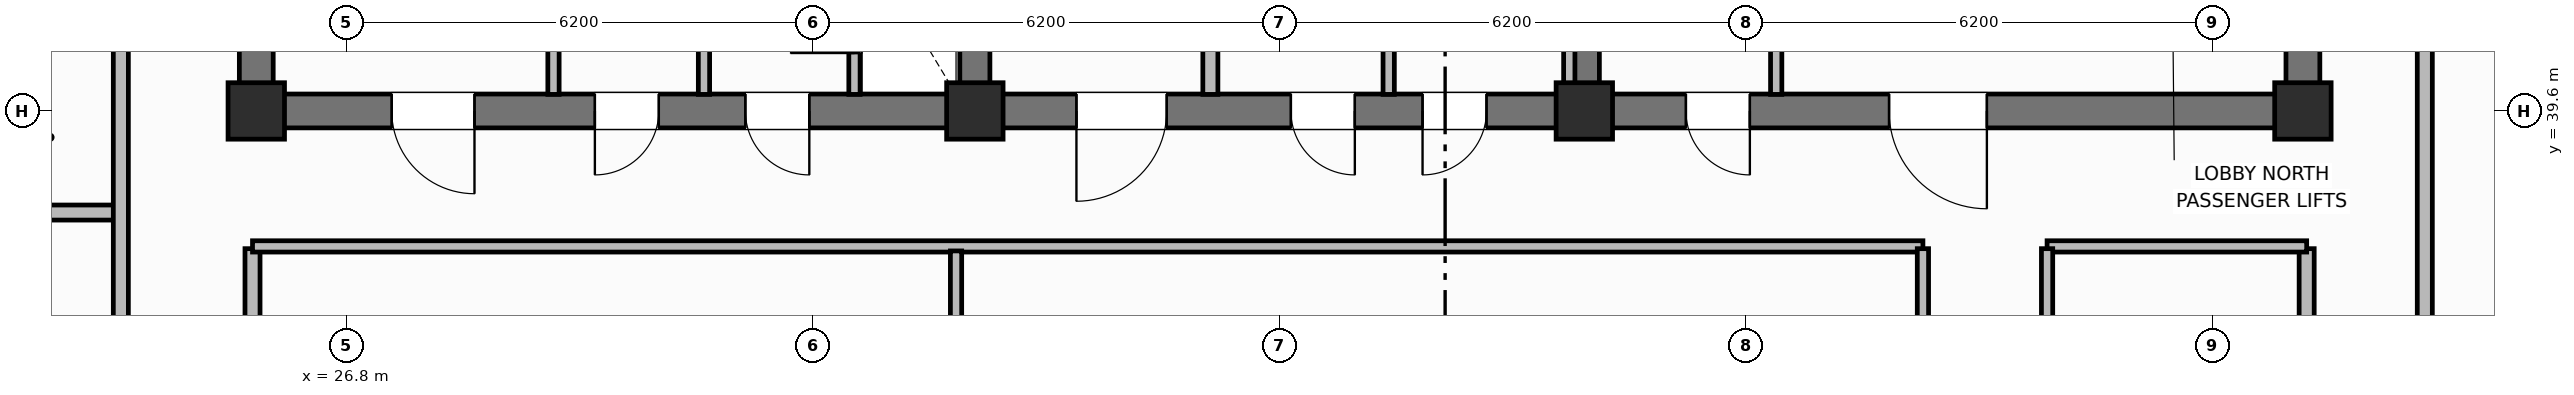
"""IFC4 building model, lengths in metres.
Left out: names, types, materials, properties, quantities, classifications, styles, units other than length and angle.
Written with IfcOpenShell. Run it as: python <this file> out.ifc"""

import sys

from ifc_helpers import new_model, si_unit, direction, frame, frame_2d, origin, origin_2d, place, context, subcontext, project, spatial, rectangle, extrude, element, fill, save


model = new_model("IFC4")
c1 = context("Model", 3, precision=1e-05, world=origin(), true_north=direction((0.0, 1.0)))
c2 = subcontext(c1, "Body", "Model", "MODEL_VIEW")
j1 = project(units=[si_unit("LENGTHUNIT", "METRE"), si_unit("PLANEANGLEUNIT", "RADIAN")], contexts=[c1])
p1 = place(None, origin())
s1 = spatial("IfcSite", under=j1, at=p1, CompositionType="ELEMENT")
p2 = place(p1, origin())
s2 = spatial("IfcBuilding", under=s1, at=p2, CompositionType="ELEMENT")
p3 = place(p2, frame((0.0, 0.0, 271.3)))
s3 = spatial("IfcBuildingStorey", under=s2, at=p3, CompositionType="ELEMENT", Elevation=271.3)
for number, where, z_axis, x_axis in (
    (1, (25.6, 39.825, 0.0), (0.0, 0.0, 1.0), (0.0, 1.0, 0.0)),
    (2, (52.8, 39.825, 0.0), (0.0, 0.0, 1.0), (0.0, 1.0, 0.0)),
):
    element("IfcWall", number, at=place(p3, frame(where, z_axis=z_axis, x_axis=x_axis)), inside=s3, PredefinedType="SHEAR", context=c2, shape_type="SweptSolid", body=[
        extrude(rectangle(XDim=5.75, YDim=0.45, at=frame_2d((2.875, 0.0))), origin(), (0.0, 0.0, 1.0), 3.7),
    ])
p4 = place(p3, frame((52.8, 39.6, 0.0), z_axis=(0.0, 0.0, 1.0), x_axis=(-1.0, 0.0, 0.0)))
e3 = element("IfcWall", 3, at=p4, inside=s3, PredefinedType="SHEAR", context=c2, shape_type="SweptSolid", body=[
    extrude(rectangle(XDim=27.2, YDim=0.45, at=frame_2d((13.6, 0.0))), origin(), (0.0, 0.0, 1.0), 3.7),
])
p5 = place(p4, frame((24.3, 0.0, 0.0)))
e4 = element("IfcOpeningElement", 4, at=p5, cuts=e3, PredefinedType="OPENING", context=c2, shape_type="SweptSolid", body=[
    extrude(rectangle(XDim=1.1, YDim=2.15, at=frame_2d((0.55, 1.075))), frame((0.0, 0.235, 0.0), z_axis=(0.0, -1.0, 0.0), x_axis=(1.0, 0.0, 0.0)), (0.0, 0.0, 1.0), 0.47),
])
p6 = place(p4, frame((21.85, 0.0, 0.0)))
e5 = element("IfcOpeningElement", 5, at=p6, cuts=e3, PredefinedType="OPENING", context=c2, shape_type="SweptSolid", body=[
    extrude(rectangle(XDim=0.85, YDim=2.1, at=frame_2d((0.425, 1.05))), frame((0.0, 0.235, 0.0), z_axis=(0.0, -1.0, 0.0), x_axis=(1.0, 0.0, 0.0)), (0.0, 0.0, 1.0), 0.47),
])
p7 = place(p4, frame((19.85, 0.0, 0.0)))
e6 = element("IfcOpeningElement", 6, at=p7, cuts=e3, PredefinedType="OPENING", context=c2, shape_type="SweptSolid", body=[
    extrude(rectangle(XDim=0.85, YDim=2.1, at=frame_2d((0.425, 1.05))), frame((0.0, 0.235, 0.0), z_axis=(0.0, -1.0, 0.0), x_axis=(1.0, 0.0, 0.0)), (0.0, 0.0, 1.0), 0.47),
])
p8 = place(p4, frame((15.1, 0.0, 0.0)))
e7 = element("IfcOpeningElement", 7, at=p8, cuts=e3, PredefinedType="OPENING", context=c2, shape_type="SweptSolid", body=[
    extrude(rectangle(XDim=1.2, YDim=2.15, at=frame_2d((0.6, 1.075))), frame((0.0, 0.235, 0.0), z_axis=(0.0, -1.0, 0.0), x_axis=(1.0, 0.0, 0.0)), (0.0, 0.0, 1.0), 0.47),
])
p9 = place(p4, frame((12.6, 0.0, 0.0)))
e8 = element("IfcOpeningElement", 8, at=p9, cuts=e3, PredefinedType="OPENING", context=c2, shape_type="SweptSolid", body=[
    extrude(rectangle(XDim=0.85, YDim=2.1, at=frame_2d((0.425, 1.05))), frame((0.0, 0.235, 0.0), z_axis=(0.0, -1.0, 0.0), x_axis=(1.0, 0.0, 0.0)), (0.0, 0.0, 1.0), 0.47),
])
p10 = place(p4, frame((10.85, 0.0, 0.0)))
e9 = element("IfcOpeningElement", 9, at=p10, cuts=e3, PredefinedType="OPENING", context=c2, shape_type="SweptSolid", body=[
    extrude(rectangle(XDim=0.85, YDim=2.1, at=frame_2d((0.425, 1.05))), frame((0.0, 0.235, 0.0), z_axis=(0.0, -1.0, 0.0), x_axis=(1.0, 0.0, 0.0)), (0.0, 0.0, 1.0), 0.47),
])
p11 = place(p4, frame((7.35, 0.0, 0.0)))
e10 = element("IfcOpeningElement", 10, at=p11, cuts=e3, PredefinedType="OPENING", context=c2, shape_type="SweptSolid", body=[
    extrude(rectangle(XDim=0.85, YDim=2.1, at=frame_2d((0.425, 1.05))), frame((0.0, 0.235, 0.0), z_axis=(0.0, -1.0, 0.0), x_axis=(1.0, 0.0, 0.0)), (0.0, 0.0, 1.0), 0.47),
])
p12 = place(p4, frame((4.2, 0.0, 0.0)))
e11 = element("IfcOpeningElement", 11, at=p12, cuts=e3, PredefinedType="OPENING", context=c2, shape_type="SweptSolid", body=[
    extrude(rectangle(XDim=1.3, YDim=2.2, at=frame_2d((0.65, 1.1))), frame((0.0, 0.235, 0.0), z_axis=(0.0, -1.0, 0.0), x_axis=(1.0, 0.0, 0.0)), (0.0, 0.0, 1.0), 0.47),
])
for number, where, z_axis, x_axis in (
    (12, (35.15, 39.825, 0.0), (0.0, 0.0, 1.0), (0.0, 1.0, 0.0)),
    (13, (43.25, 39.825, 0.0), (0.0, 0.0, 1.0), (0.0, 1.0, 0.0)),
):
    element("IfcWall", number, at=place(p3, frame(where, z_axis=z_axis, x_axis=x_axis)), inside=s3, PredefinedType="SHEAR", context=c2, shape_type="SweptSolid", body=[
        extrude(rectangle(XDim=5.75, YDim=0.4, at=frame_2d((2.875, 0.0))), origin(), (0.0, 0.0, 1.0), 3.7),
    ])
for number, where, z_axis, x_axis in (
    (14, (25.6, 39.6, 0.0), (0.0, 0.0, 1.0), (1.0, 0.0, 0.0)),
    (15, (35.15, 39.6, 0.0), (0.0, 0.0, 1.0), (1.0, 0.0, 0.0)),
    (16, (43.25, 39.6, 0.0), (0.0, 0.0, 1.0), (1.0, 0.0, 0.0)),
    (17, (52.8, 39.6, 0.0), (0.0, 0.0, 1.0), (1.0, 0.0, 0.0)),
):
    element("IfcColumn", number, at=place(p3, frame(where, z_axis=z_axis, x_axis=x_axis)), inside=s3, PredefinedType="COLUMN", context=c2, shape_type="SweptSolid", body=[
        extrude(rectangle(XDim=0.75, YDim=0.75, at=origin_2d()), origin(), (0.0, 0.0, 1.0), 3.7),
    ])
p13 = place(p3, frame((33.55, 39.82, 0.0), z_axis=(0.0, 0.0, 1.0), x_axis=(0.0, 1.0, 0.0)))
e18 = element("IfcWall", 18, at=p13, inside=s3, PredefinedType="PARTITIONING", context=c2, shape_type="SweptSolid", body=[
    extrude(rectangle(XDim=2.13, YDim=0.15, at=frame_2d((1.065, 0.0))), origin(), (0.0, 0.0, 1.0), 2.56),
])
p14 = place(p13, frame((0.55, 0.0, 0.0)))
e19 = element("IfcOpeningElement", 19, at=p14, cuts=e18, PredefinedType="OPENING", context=c2, shape_type="SweptSolid", body=[
    extrude(rectangle(XDim=0.85, YDim=2.05, at=frame_2d((0.425, 1.025))), frame((0.0, 0.085, 0.0), z_axis=(0.0, -1.0, 0.0), x_axis=(1.0, 0.0, 0.0)), (0.0, 0.0, 1.0), 0.17),
])
for number, where, z_axis, x_axis in (
    (20, (29.55, 39.82, 0.0), (0.0, 0.0, 1.0), (0.0, 1.0, 0.0)),
    (21, (31.55, 39.82, 0.0), (0.0, 0.0, 1.0), (0.0, 1.0, 0.0)),
):
    element("IfcWall", number, at=place(p3, frame(where, z_axis=z_axis, x_axis=x_axis)), inside=s3, PredefinedType="PARTITIONING", context=c2, shape_type="SweptSolid", body=[
        extrude(rectangle(XDim=2.13, YDim=0.15, at=frame_2d((1.065, 0.0))), origin(), (0.0, 0.0, 1.0), 2.56),
    ])
p15 = place(p3, frame((38.28, 39.82, 0.0), z_axis=(0.0, 0.0, 1.0), x_axis=(0.0, 1.0, 0.0)))
e22 = element("IfcWall", 22, at=p15, inside=s3, PredefinedType="PARTITIONING", context=c2, shape_type="SweptSolid", body=[
    extrude(rectangle(XDim=5.63, YDim=0.2, at=frame_2d((2.815, 0.0))), origin(), (0.0, 0.0, 1.0), 2.56),
])
for number, where, z_axis, x_axis in (
    (23, (43.05, 39.82, 0.0), (0.0, 0.0, 1.0), (0.0, 1.0, 0.0)),
    (24, (40.65, 39.82, 0.0), (0.0, 0.0, 1.0), (0.0, 1.0, 0.0)),
    (25, (45.8, 39.82, 0.0), (0.0, 0.0, 1.0), (0.0, 1.0, 0.0)),
):
    element("IfcWall", number, at=place(p3, frame(where, z_axis=z_axis, x_axis=x_axis)), inside=s3, PredefinedType="PARTITIONING", context=c2, shape_type="SweptSolid", body=[
        extrude(rectangle(XDim=5.63, YDim=0.15, at=frame_2d((2.815, 0.0))), origin(), (0.0, 0.0, 1.0), 2.56),
    ])
for number, where, z_axis, x_axis in (
    (26, (25.55, 18.63, 0.0), (0.0, 0.0, 1.0), (0.0, 1.0, 0.0)),
    (27, (52.85, 18.63, 0.0), (0.0, 0.0, 1.0), (0.0, 1.0, 0.0)),
):
    element("IfcWall", number, at=place(p3, frame(where, z_axis=z_axis, x_axis=x_axis)), inside=s3, PredefinedType="PARTITIONING", context=c2, shape_type="SweptSolid", body=[
        extrude(rectangle(XDim=19.14, YDim=0.2, at=frame_2d((9.57, 0.0))), origin(), (0.0, 0.0, 1.0), 2.56),
    ])
p16 = place(p3, frame((25.55, 37.8, 0.0), z_axis=(0.0, 0.0, 1.0), x_axis=(1.0, 0.0, 0.0)))
e28 = element("IfcWall", 28, at=p16, inside=s3, PredefinedType="PARTITIONING", context=c2, shape_type="SweptSolid", body=[
    extrude(rectangle(XDim=22.2, YDim=0.15, at=frame_2d((11.1, 0.0))), origin(), (0.0, 0.0, 1.0), 2.56),
])
p17 = place(p3, frame((49.4, 37.8, 0.0), z_axis=(0.0, 0.0, 1.0), x_axis=(1.0, 0.0, 0.0)))
e29 = element("IfcWall", 29, at=p17, inside=s3, PredefinedType="PARTITIONING", context=c2, shape_type="SweptSolid", body=[
    extrude(rectangle(XDim=3.45, YDim=0.15, at=frame_2d((1.725, 0.0))), origin(), (0.0, 0.0, 1.0), 2.56),
])
p18 = place(p3, frame((34.9, 18.66, 0.0), z_axis=(0.0, 0.0, 1.0), x_axis=(0.0, 1.0, 0.0)))
e30 = element("IfcWall", 30, at=p18, inside=s3, PredefinedType="PARTITIONING", context=c2, shape_type="SweptSolid", body=[
    extrude(rectangle(XDim=19.08, YDim=0.15, at=frame_2d((9.54, 0.0))), origin(), (0.0, 0.0, 1.0), 2.56),
])
p19 = place(p18, frame((5.0, 0.0, 0.0)))
e31 = element("IfcOpeningElement", 31, at=p19, cuts=e30, PredefinedType="OPENING", context=c2, shape_type="SweptSolid", body=[
    extrude(rectangle(XDim=1.0, YDim=2.15, at=frame_2d((0.5, 1.075))), frame((0.0, 0.085, 0.0), z_axis=(0.0, -1.0, 0.0), x_axis=(1.0, 0.0, 0.0)), (0.0, 0.0, 1.0), 0.17),
])
p20 = place(p3, frame((47.75, 18.63, 0.0), z_axis=(0.0, 0.0, 1.0), x_axis=(0.0, 1.0, 0.0)))
e32 = element("IfcWall", 32, at=p20, inside=s3, PredefinedType="PARTITIONING", context=c2, shape_type="SweptSolid", body=[
    extrude(rectangle(XDim=19.14, YDim=0.15, at=frame_2d((9.57, 0.0))), origin(), (0.0, 0.0, 1.0), 2.56),
])
p21 = place(p20, frame((2.4, 0.0, 0.0)))
e33 = element("IfcOpeningElement", 33, at=p21, cuts=e32, PredefinedType="OPENING", context=c2, shape_type="SweptSolid", body=[
    extrude(rectangle(XDim=0.9, YDim=2.1, at=frame_2d((0.45, 1.05))), frame((0.0, 0.085, 0.0), z_axis=(0.0, -1.0, 0.0), x_axis=(1.0, 0.0, 0.0)), (0.0, 0.0, 1.0), 0.17),
])
p22 = place(p20, frame((10.804, 0.0, 0.0)))
e34 = element("IfcOpeningElement", 34, at=p22, cuts=e32, PredefinedType="OPENING", context=c2, shape_type="SweptSolid", body=[
    extrude(rectangle(XDim=0.9, YDim=2.1, at=frame_2d((0.45, 1.05))), frame((0.0, 0.085, 0.0), z_axis=(0.0, -1.0, 0.0), x_axis=(1.0, 0.0, 0.0)), (0.0, 0.0, 1.0), 0.17),
])
p23 = place(p3, frame((49.4, 18.63, 0.0), z_axis=(0.0, 0.0, 1.0), x_axis=(0.0, 1.0, 0.0)))
e35 = element("IfcWall", 35, at=p23, inside=s3, PredefinedType="PARTITIONING", context=c2, shape_type="SweptSolid", body=[
    extrude(rectangle(XDim=19.14, YDim=0.15, at=frame_2d((9.57, 0.0))), origin(), (0.0, 0.0, 1.0), 2.56),
])
p24 = place(p23, frame((2.4, 0.0, 0.0)))
e36 = element("IfcOpeningElement", 36, at=p24, cuts=e35, PredefinedType="OPENING", context=c2, shape_type="SweptSolid", body=[
    extrude(rectangle(XDim=1.0, YDim=2.15, at=frame_2d((0.5, 1.075))), frame((0.0, 0.085, 0.0), z_axis=(0.0, -1.0, 0.0), x_axis=(1.0, 0.0, 0.0)), (0.0, 0.0, 1.0), 0.17),
])
p25 = place(p23, frame((10.804, 0.0, 0.0)))
e37 = element("IfcOpeningElement", 37, at=p25, cuts=e35, PredefinedType="OPENING", context=c2, shape_type="SweptSolid", body=[
    extrude(rectangle(XDim=1.0, YDim=2.15, at=frame_2d((0.5, 1.075))), frame((0.0, 0.085, 0.0), z_axis=(0.0, -1.0, 0.0), x_axis=(1.0, 0.0, 0.0)), (0.0, 0.0, 1.0), 0.17),
])
p26 = place(p3, frame((19.53, 38.25, 0.0), z_axis=(0.0, 0.0, 1.0), x_axis=(1.0, 0.0, 0.0)))
e38 = element("IfcWall", 38, at=p26, inside=s3, PredefinedType="PARTITIONING", context=c2, shape_type="SweptSolid", body=[
    extrude(rectangle(XDim=4.27, YDim=0.2, at=frame_2d((2.135, 0.0))), origin(), (0.0, 0.0, 1.0), 2.56),
])
p27 = place(p3, frame((23.8, 9.95, 0.0), z_axis=(0.0, 0.0, 1.0), x_axis=(0.0, 1.0, 0.0)))
e39 = element("IfcWall", 39, at=p27, inside=s3, PredefinedType="PARTITIONING", context=c2, shape_type="SweptSolid", body=[
    extrude(rectangle(XDim=36.5, YDim=0.2, at=frame_2d((18.25, 0.0))), origin(), (0.0, 0.0, 1.0), 2.56),
])
p28 = place(p27, frame((3.11, 0.0, 0.0)))
e40 = element("IfcOpeningElement", 40, at=p28, cuts=e39, PredefinedType="OPENING", context=c2, shape_type="SweptSolid", body=[
    extrude(rectangle(XDim=1.0, YDim=2.15, at=frame_2d((0.5, 1.075))), frame((0.0, 0.11, 0.0), z_axis=(0.0, -1.0, 0.0), x_axis=(1.0, 0.0, 0.0)), (0.0, 0.0, 1.0), 0.22),
])
p29 = place(p27, frame((11.99, 0.0, 0.0)))
e41 = element("IfcOpeningElement", 41, at=p29, cuts=e39, PredefinedType="OPENING", context=c2, shape_type="SweptSolid", body=[
    extrude(rectangle(XDim=1.0, YDim=2.15, at=frame_2d((0.5, 1.075))), frame((0.0, 0.11, 0.0), z_axis=(0.0, -1.0, 0.0), x_axis=(1.0, 0.0, 0.0)), (0.0, 0.0, 1.0), 0.22),
])
p30 = place(p27, frame((23.5, 0.0, 0.0)))
e42 = element("IfcOpeningElement", 42, at=p30, cuts=e39, PredefinedType="OPENING", context=c2, shape_type="SweptSolid", body=[
    extrude(rectangle(XDim=1.0, YDim=2.15, at=frame_2d((0.5, 1.075))), frame((0.0, 0.11, 0.0), z_axis=(0.0, -1.0, 0.0), x_axis=(1.0, 0.0, 0.0)), (0.0, 0.0, 1.0), 0.22),
])
p31 = place(p27, frame((31.2, 0.0, 0.0)))
e43 = element("IfcOpeningElement", 43, at=p31, cuts=e39, PredefinedType="OPENING", context=c2, shape_type="SweptSolid", body=[
    extrude(rectangle(XDim=1.0, YDim=2.15, at=frame_2d((0.5, 1.075))), frame((0.0, 0.11, 0.0), z_axis=(0.0, -1.0, 0.0), x_axis=(1.0, 0.0, 0.0)), (0.0, 0.0, 1.0), 0.22),
])
p32 = place(p3, frame((54.42, 9.95, 0.0), z_axis=(0.0, 0.0, 1.0), x_axis=(0.0, 1.0, 0.0)))
e44 = element("IfcWall", 44, at=p32, inside=s3, PredefinedType="PARTITIONING", context=c2, shape_type="SweptSolid", body=[
    extrude(rectangle(XDim=36.5, YDim=0.2, at=frame_2d((18.25, 0.0))), origin(), (0.0, 0.0, 1.0), 2.56),
])
p33 = place(p32, frame((3.25, 0.0, 0.0)))
e45 = element("IfcOpeningElement", 45, at=p33, cuts=e44, PredefinedType="OPENING", context=c2, shape_type="SweptSolid", body=[
    extrude(rectangle(XDim=1.0, YDim=2.15, at=frame_2d((0.5, 1.075))), frame((0.0, 0.11, 0.0), z_axis=(0.0, -1.0, 0.0), x_axis=(1.0, 0.0, 0.0)), (0.0, 0.0, 1.0), 0.22),
])
p34 = place(p32, frame((14.25, 0.0, 0.0)))
e46 = element("IfcOpeningElement", 46, at=p34, cuts=e44, PredefinedType="OPENING", context=c2, shape_type="SweptSolid", body=[
    extrude(rectangle(XDim=1.0, YDim=2.15, at=frame_2d((0.5, 1.075))), frame((0.0, 0.11, 0.0), z_axis=(0.0, -1.0, 0.0), x_axis=(1.0, 0.0, 0.0)), (0.0, 0.0, 1.0), 0.22),
])
p35 = place(p14, origin())
e47 = element("IfcDoor", 47, at=p35, inside=s3, OperationType="SINGLE_SWING_LEFT", PredefinedType="TRAPDOOR", context=c2, shape_type="SweptSolid", body=[
    extrude(rectangle(XDim=0.85, YDim=2.05, at=frame_2d((0.425, 1.025))), frame((0.0, 0.025, 0.0), z_axis=(0.0, -1.0, 0.0), x_axis=(1.0, 0.0, 0.0)), (0.0, 0.0, 1.0), 0.05),
])
fill(e19, e47)
p36 = place(p5, origin())
e48 = element("IfcDoor", 48, at=p36, inside=s3, OperationType="SINGLE_SWING_LEFT", PredefinedType="DOOR", context=c2, shape_type="SweptSolid", body=[
    extrude(rectangle(XDim=1.1, YDim=2.15, at=frame_2d((0.55, 1.075))), frame((0.0, 0.025, 0.0), z_axis=(0.0, -1.0, 0.0), x_axis=(1.0, 0.0, 0.0)), (0.0, 0.0, 1.0), 0.05),
])
fill(e4, e48)
p37 = place(p6, origin())
e49 = element("IfcDoor", 49, at=p37, inside=s3, OperationType="SINGLE_SWING_RIGHT", PredefinedType="DOOR", context=c2, shape_type="SweptSolid", body=[
    extrude(rectangle(XDim=0.85, YDim=2.1, at=frame_2d((0.425, 1.05))), frame((0.0, 0.025, 0.0), z_axis=(0.0, -1.0, 0.0), x_axis=(1.0, 0.0, 0.0)), (0.0, 0.0, 1.0), 0.05),
])
fill(e5, e49)
p38 = place(p7, origin())
e50 = element("IfcDoor", 50, at=p38, inside=s3, OperationType="SINGLE_SWING_LEFT", PredefinedType="DOOR", context=c2, shape_type="SweptSolid", body=[
    extrude(rectangle(XDim=0.85, YDim=2.1, at=frame_2d((0.425, 1.05))), frame((0.0, 0.025, 0.0), z_axis=(0.0, -1.0, 0.0), x_axis=(1.0, 0.0, 0.0)), (0.0, 0.0, 1.0), 0.05),
])
fill(e6, e50)
p39 = place(p8, origin())
e51 = element("IfcDoor", 51, at=p39, inside=s3, OperationType="SINGLE_SWING_RIGHT", PredefinedType="DOOR", context=c2, shape_type="SweptSolid", body=[
    extrude(rectangle(XDim=1.2, YDim=2.15, at=frame_2d((0.6, 1.075))), frame((0.0, 0.025, 0.0), z_axis=(0.0, -1.0, 0.0), x_axis=(1.0, 0.0, 0.0)), (0.0, 0.0, 1.0), 0.05),
])
fill(e7, e51)
p40 = place(p9, origin())
e52 = element("IfcDoor", 52, at=p40, inside=s3, OperationType="SINGLE_SWING_LEFT", PredefinedType="DOOR", context=c2, shape_type="SweptSolid", body=[
    extrude(rectangle(XDim=0.85, YDim=2.1, at=frame_2d((0.425, 1.05))), frame((0.0, 0.025, 0.0), z_axis=(0.0, -1.0, 0.0), x_axis=(1.0, 0.0, 0.0)), (0.0, 0.0, 1.0), 0.05),
])
fill(e8, e52)
p41 = place(p10, origin())
e53 = element("IfcDoor", 53, at=p41, inside=s3, OperationType="SINGLE_SWING_RIGHT", PredefinedType="DOOR", context=c2, shape_type="SweptSolid", body=[
    extrude(rectangle(XDim=0.85, YDim=2.1, at=frame_2d((0.425, 1.05))), frame((0.0, 0.025, 0.0), z_axis=(0.0, -1.0, 0.0), x_axis=(1.0, 0.0, 0.0)), (0.0, 0.0, 1.0), 0.05),
])
fill(e9, e53)
p42 = place(p11, origin())
e54 = element("IfcDoor", 54, at=p42, inside=s3, OperationType="SINGLE_SWING_LEFT", PredefinedType="DOOR", context=c2, shape_type="SweptSolid", body=[
    extrude(rectangle(XDim=0.85, YDim=2.1, at=frame_2d((0.425, 1.05))), frame((0.0, 0.025, 0.0), z_axis=(0.0, -1.0, 0.0), x_axis=(1.0, 0.0, 0.0)), (0.0, 0.0, 1.0), 0.05),
])
fill(e10, e54)
p43 = place(p12, origin())
e55 = element("IfcDoor", 55, at=p43, inside=s3, OperationType="SINGLE_SWING_LEFT", PredefinedType="DOOR", context=c2, shape_type="SweptSolid", body=[
    extrude(rectangle(XDim=1.3, YDim=2.2, at=frame_2d((0.65, 1.1))), frame((0.0, 0.025, 0.0), z_axis=(0.0, -1.0, 0.0), x_axis=(1.0, 0.0, 0.0)), (0.0, 0.0, 1.0), 0.05),
])
fill(e11, e55)
save(model, sys.argv[1])
